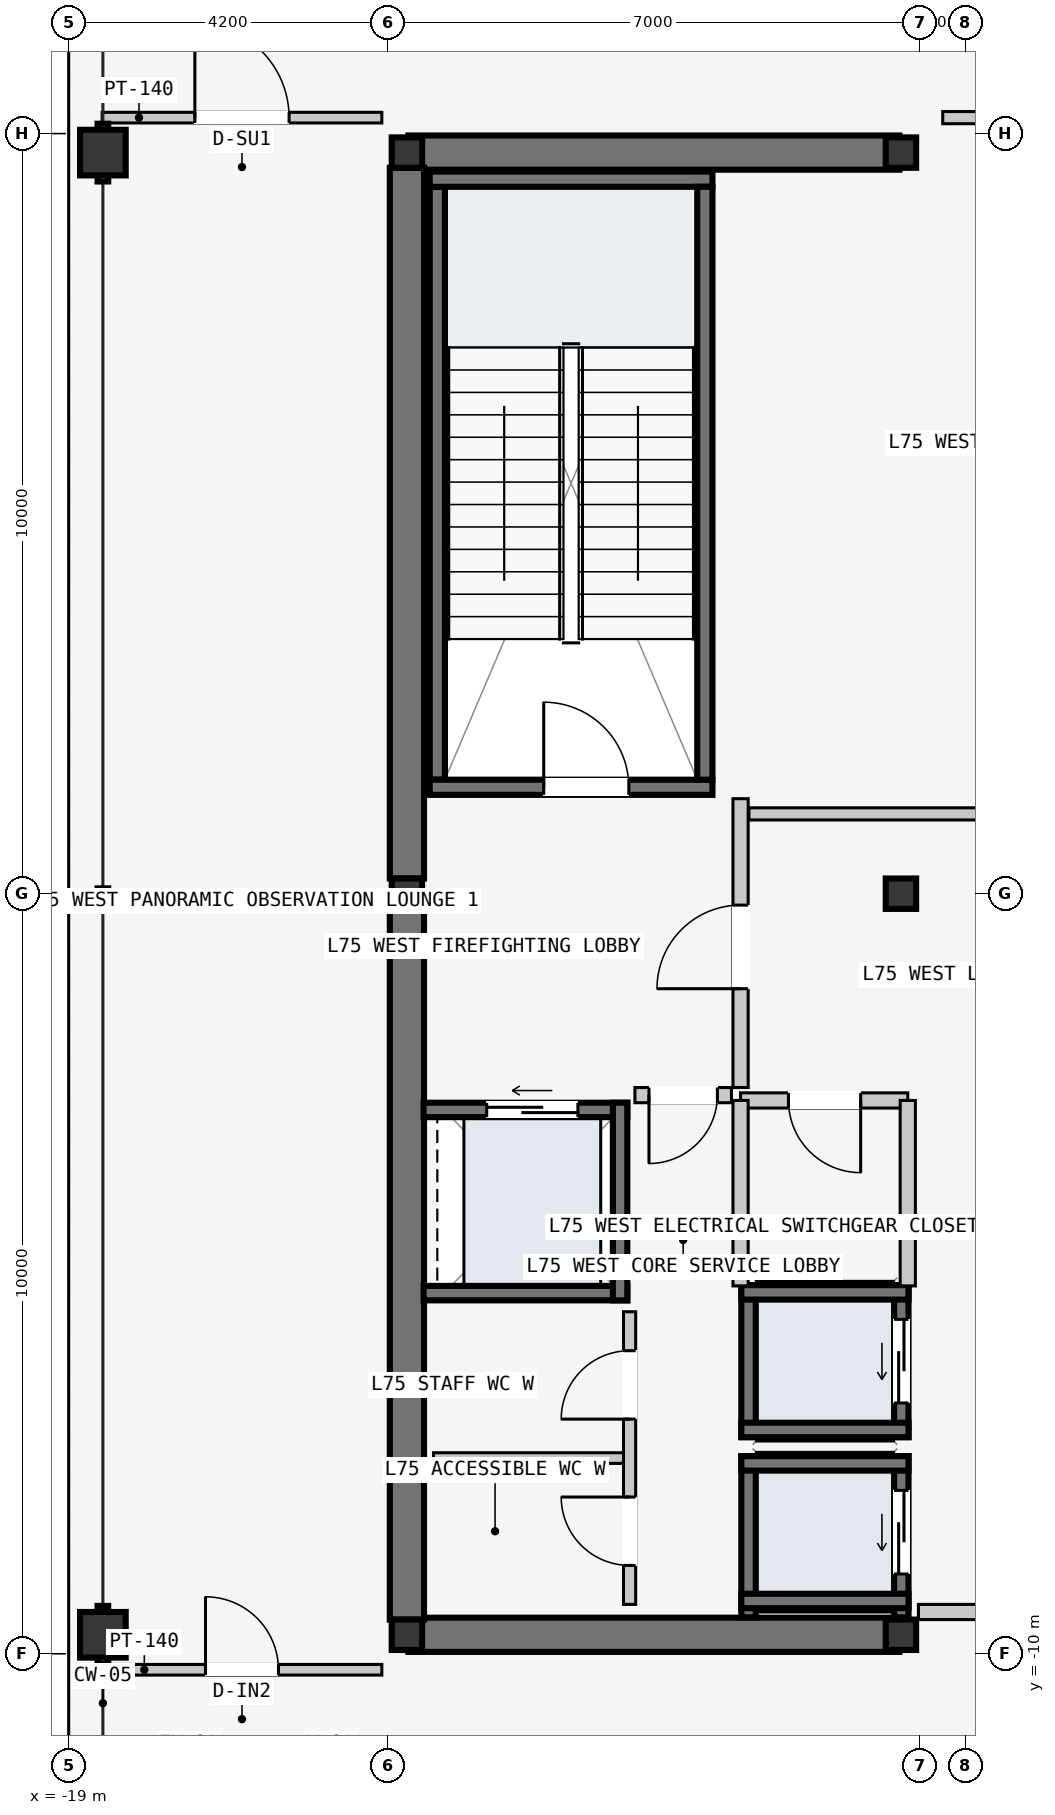
"""IFC4 building model, lengths in metres.
Left out: names, types, materials, properties, quantities, classifications, styles, units other than length and angle.
Written with IfcOpenShell. Run it as: python <this file> out.ifc"""

import sys

from ifc_helpers import new_model, si_unit, direction, frame, frame_2d, origin, origin_2d, place, context, subcontext, project, spatial, rectangle, hollow_rectangle, i_section, extrude, element, fill, save


model = new_model("IFC4")
c1 = context("Model", 3, precision=1e-05, world=origin(), true_north=direction((0.0, 1.0)))
c2 = subcontext(c1, "Body", "Model", "MODEL_VIEW")
j1 = project(units=[si_unit("LENGTHUNIT", "METRE"), si_unit("PLANEANGLEUNIT", "RADIAN")], contexts=[c1])
p1 = place(None, origin())
s1 = spatial("IfcSite", under=j1, at=p1, CompositionType="ELEMENT")
p2 = place(p1, origin())
s2 = spatial("IfcBuilding", under=s1, at=p2, CompositionType="ELEMENT")
p3 = place(p2, frame((0.0, 0.0, 284.4)))
s3 = spatial("IfcBuildingStorey", under=s2, at=p3, CompositionType="ELEMENT", Elevation=284.4)
for number, where, z_axis, x_axis in (
    (1, (-14.53, -9.75, -0.2), (0.0, 0.0, 1.0), (1.0, 0.0, 0.0)),
    (2, (-14.53, 9.75, -0.2), (0.0, 0.0, 1.0), (1.0, 0.0, 0.0)),
):
    element("IfcWall", number, at=place(p3, frame(where, z_axis=z_axis, x_axis=x_axis)), inside=s3, PredefinedType="SHEAR", context=c2, shape_type="SweptSolid", body=[
        extrude(rectangle(XDim=6.46, YDim=0.45, at=frame_2d((3.23, 0.0))), origin(), (0.0, 0.0, 1.0), 4.8),
    ])
for number, where, z_axis, x_axis in (
    (3, (-14.55, -9.55, -0.2), (0.0, 0.0, 1.0), (0.0, 1.0, 0.0)),
    (4, (-14.55, 0.2, -0.2), (0.0, 0.0, 1.0), (0.0, 1.0, 0.0)),
):
    element("IfcWall", number, at=place(p3, frame(where, z_axis=z_axis, x_axis=x_axis)), inside=s3, PredefinedType="SHEAR", context=c2, shape_type="SweptSolid", body=[
        extrude(rectangle(XDim=9.35, YDim=0.45, at=frame_2d((4.675, 0.0))), origin(), (0.0, 0.0, 1.0), 4.8),
    ])
p4 = place(p3, frame((-14.15, 1.5, -0.2), z_axis=(0.0, 0.0, 1.0), x_axis=(0.0, 1.0, 0.0)))
e5 = element("IfcWall", 5, at=p4, inside=s3, PredefinedType="SOLIDWALL", context=c2, shape_type="SweptSolid", body=[
    extrude(rectangle(XDim=7.8, YDim=0.2, at=frame_2d((3.9, 0.0))), origin(), (0.0, 0.0, 1.0), 4.8),
])
p5 = place(p3, frame((-14.25, 1.4, -0.2), z_axis=(0.0, 0.0, 1.0), x_axis=(1.0, 0.0, 0.0)))
e6 = element("IfcWall", 6, at=p5, inside=s3, PredefinedType="SOLIDWALL", context=c2, shape_type="SweptSolid", body=[
    extrude(rectangle(XDim=3.72, YDim=0.2, at=frame_2d((1.86, 0.0))), origin(), (0.0, 0.0, 1.0), 4.8),
])
p6 = place(p5, frame((1.5, 0.0, 0.2)))
e7 = element("IfcOpeningElement", 7, at=p6, cuts=e6, PredefinedType="OPENING", context=c2, shape_type="SweptSolid", body=[
    extrude(rectangle(XDim=1.12, YDim=2.18, at=frame_2d((0.56, 1.09))), frame((0.0, 0.11, 0.0), z_axis=(0.0, -1.0, 0.0), x_axis=(1.0, 0.0, 0.0)), (0.0, 0.0, 1.0), 0.22),
])
p7 = place(p3, frame((-14.25, 9.4, -0.2), z_axis=(0.0, 0.0, 1.0), x_axis=(1.0, 0.0, 0.0)))
e8 = element("IfcWall", 8, at=p7, inside=s3, PredefinedType="SOLIDWALL", context=c2, shape_type="SweptSolid", body=[
    extrude(rectangle(XDim=3.72, YDim=0.2, at=frame_2d((1.86, 0.0))), origin(), (0.0, 0.0, 1.0), 4.8),
])
p8 = place(p3, frame((-10.63, 1.5, -0.2), z_axis=(0.0, 0.0, 1.0), x_axis=(0.0, 1.0, 0.0)))
e9 = element("IfcWall", 9, at=p8, inside=s3, PredefinedType="SOLIDWALL", context=c2, shape_type="SweptSolid", body=[
    extrude(rectangle(XDim=7.8, YDim=0.2, at=frame_2d((3.9, 0.0))), origin(), (0.0, 0.0, 1.0), 4.8),
])
for number, where, z_axis, x_axis in (
    (10, (-14.55, -9.75, 0.0), (0.0, 0.0, 1.0), (1.0, 0.0, 0.0)),
    (11, (-14.55, 0.0, 0.0), (0.0, 0.0, 1.0), (1.0, 0.0, 0.0)),
    (12, (-14.55, 9.75, 0.0), (0.0, 0.0, 1.0), (1.0, 0.0, 0.0)),
    (13, (-8.05, -9.75, 0.0), (0.0, 0.0, 1.0), (1.0, 0.0, 0.0)),
    (14, (-8.05, 0.0, 0.0), (0.0, 0.0, 1.0), (1.0, 0.0, 0.0)),
    (15, (-8.05, 9.75, 0.0), (0.0, 0.0, 1.0), (1.0, 0.0, 0.0)),
):
    element("IfcColumn", number, at=place(p3, frame(where, z_axis=z_axis, x_axis=x_axis)), inside=s3, PredefinedType="COLUMN", context=c2, shape_type="SweptSolid", body=[
        extrude(i_section(OverallWidth=0.4, OverallDepth=0.4, WebThickness=0.013, FlangeThickness=0.021, at=origin_2d()), origin(), (0.0, 0.0, 1.0), 4.8),
    ])
for number, where, z_axis, x_axis in (
    (16, (-18.55, -9.75, 0.0), (0.0, 0.0, 1.0), (0.0, 1.0, 0.0)),
    (17, (-18.55, 9.75, 0.0), (0.0, 0.0, 1.0), (0.0, 1.0, 0.0)),
):
    element("IfcColumn", number, at=place(p3, frame(where, z_axis=z_axis, x_axis=x_axis)), inside=s3, PredefinedType="COLUMN", context=c2, shape_type="SweptSolid", body=[
        extrude(hollow_rectangle(XDim=0.6, YDim=0.6, WallThickness=0.025, at=origin_2d()), origin(), (0.0, 0.0, 1.0), 4.8),
    ])
p9 = place(p3, frame((-8.045, -9.52, -0.2), z_axis=(0.0, 0.0, 1.0), x_axis=(0.0, 1.0, 0.0)))
e18 = element("IfcWall", 18, at=p9, inside=s3, PredefinedType="SOLIDWALL", context=c2, shape_type="SweptSolid", body=[
    extrude(rectangle(XDim=2.12, YDim=0.19, at=frame_2d((1.06, 0.0))), origin(), (0.0, 0.0, 1.0), 4.8),
])
p10 = place(p9, frame((0.57, 0.0, 0.2)))
e19 = element("IfcOpeningElement", 19, at=p10, cuts=e18, PredefinedType="OPENING", context=c2, shape_type="SweptSolid", body=[
    extrude(rectangle(XDim=1.1, YDim=2.2, at=frame_2d((0.55, 1.1))), frame((0.0, 0.105, 0.0), z_axis=(0.0, -1.0, 0.0), x_axis=(1.0, 0.0, 0.0)), (0.0, 0.0, 1.0), 0.21),
])
p11 = place(p3, frame((-10.055, -9.52, -0.2), z_axis=(0.0, 0.0, 1.0), x_axis=(0.0, 1.0, 0.0)))
e20 = element("IfcWall", 20, at=p11, inside=s3, PredefinedType="SOLIDWALL", context=c2, shape_type="SweptSolid", body=[
    extrude(rectangle(XDim=2.12, YDim=0.19, at=frame_2d((1.06, 0.0))), origin(), (0.0, 0.0, 1.0), 4.8),
])
for number, where, z_axis, x_axis in (
    (21, (-10.15, -7.495, -0.2), (0.0, 0.0, 1.0), (1.0, 0.0, 0.0)),
    (22, (-10.15, -9.305, -0.2), (0.0, 0.0, 1.0), (1.0, 0.0, 0.0)),
):
    element("IfcWall", number, at=place(p3, frame(where, z_axis=z_axis, x_axis=x_axis)), inside=s3, PredefinedType="SOLIDWALL", context=c2, shape_type="SweptSolid", body=[
        extrude(rectangle(XDim=2.2, YDim=0.19, at=frame_2d((1.1, 0.0))), origin(), (0.0, 0.0, 1.0), 4.8),
    ])
p12 = place(p3, frame((-8.045, -7.15, -0.2), z_axis=(0.0, 0.0, 1.0), x_axis=(0.0, 1.0, 0.0)))
e23 = element("IfcWall", 23, at=p12, inside=s3, PredefinedType="SOLIDWALL", context=c2, shape_type="SweptSolid", body=[
    extrude(rectangle(XDim=2.0, YDim=0.19, at=frame_2d((1.0, 0.0))), origin(), (0.0, 0.0, 1.0), 4.8),
])
p13 = place(p12, frame((0.45, 0.0, 0.2)))
e24 = element("IfcOpeningElement", 24, at=p13, cuts=e23, PredefinedType="OPENING", context=c2, shape_type="SweptSolid", body=[
    extrude(rectangle(XDim=1.1, YDim=2.2, at=frame_2d((0.55, 1.1))), frame((0.0, 0.105, 0.0), z_axis=(0.0, -1.0, 0.0), x_axis=(1.0, 0.0, 0.0)), (0.0, 0.0, 1.0), 0.21),
])
p14 = place(p3, frame((-10.055, -7.15, -0.2), z_axis=(0.0, 0.0, 1.0), x_axis=(0.0, 1.0, 0.0)))
e25 = element("IfcWall", 25, at=p14, inside=s3, PredefinedType="SOLIDWALL", context=c2, shape_type="SweptSolid", body=[
    extrude(rectangle(XDim=2.0, YDim=0.19, at=frame_2d((1.0, 0.0))), origin(), (0.0, 0.0, 1.0), 4.8),
])
for number, where, z_axis, x_axis in (
    (26, (-10.15, -5.245, -0.2), (0.0, 0.0, 1.0), (1.0, 0.0, 0.0)),
    (27, (-10.15, -7.055, -0.2), (0.0, 0.0, 1.0), (1.0, 0.0, 0.0)),
):
    element("IfcWall", number, at=place(p3, frame(where, z_axis=z_axis, x_axis=x_axis)), inside=s3, PredefinedType="SOLIDWALL", context=c2, shape_type="SweptSolid", body=[
        extrude(rectangle(XDim=2.2, YDim=0.19, at=frame_2d((1.1, 0.0))), origin(), (0.0, 0.0, 1.0), 4.8),
    ])
p15 = place(p3, frame((-14.33, -2.845, -0.2), z_axis=(0.0, 0.0, 1.0), x_axis=(1.0, 0.0, 0.0)))
e28 = element("IfcWall", 28, at=p15, inside=s3, PredefinedType="SOLIDWALL", context=c2, shape_type="SweptSolid", body=[
    extrude(rectangle(XDim=2.68, YDim=0.19, at=frame_2d((1.34, 0.0))), origin(), (0.0, 0.0, 1.0), 4.8),
])
p16 = place(p15, frame((0.83, 0.0, 0.2)))
e29 = element("IfcOpeningElement", 29, at=p16, cuts=e28, PredefinedType="OPENING", context=c2, shape_type="SweptSolid", body=[
    extrude(rectangle(XDim=1.2, YDim=2.2, at=frame_2d((0.6, 1.1))), frame((0.0, 0.105, 0.0), z_axis=(0.0, -1.0, 0.0), x_axis=(1.0, 0.0, 0.0)), (0.0, 0.0, 1.0), 0.21),
])
p17 = place(p3, frame((-14.33, -5.255, -0.2), z_axis=(0.0, 0.0, 1.0), x_axis=(1.0, 0.0, 0.0)))
e30 = element("IfcWall", 30, at=p17, inside=s3, PredefinedType="SOLIDWALL", context=c2, shape_type="SweptSolid", body=[
    extrude(rectangle(XDim=2.68, YDim=0.19, at=frame_2d((1.34, 0.0))), origin(), (0.0, 0.0, 1.0), 4.8),
])
p18 = place(p3, frame((-11.745, -5.35, -0.2), z_axis=(0.0, 0.0, 1.0), x_axis=(0.0, 1.0, 0.0)))
e31 = element("IfcWall", 31, at=p18, inside=s3, PredefinedType="SOLIDWALL", context=c2, shape_type="SweptSolid", body=[
    extrude(rectangle(XDim=2.6, YDim=0.19, at=frame_2d((1.3, 0.0))), origin(), (0.0, 0.0, 1.0), 4.8),
])
p19 = place(p3, frame((-6.02, -9.45, 0.0), z_axis=(0.0, 0.0, 1.0), x_axis=(-1.0, 0.0, 0.0)))
e32 = element("IfcWall", 32, at=p19, inside=s3, PredefinedType="PARTITIONING", context=c2, shape_type="SweptSolid", body=[
    extrude(rectangle(XDim=1.8, YDim=0.2, at=frame_2d((0.9, 0.0))), origin(), (0.0, 0.0, 1.0), 4.6),
])
p20 = place(p3, frame((-10.16, -2.55, 0.0), z_axis=(0.0, 0.0, 1.0), x_axis=(0.0, 1.0, 0.0)))
e33 = element("IfcWall", 33, at=p20, inside=s3, PredefinedType="PARTITIONING", context=c2, shape_type="SweptSolid", body=[
    extrude(rectangle(XDim=3.8, YDim=0.2, at=frame_2d((1.9, 0.0))), origin(), (0.0, 0.0, 1.0), 4.6),
])
p21 = place(p20, frame((1.3, 0.0, 0.0)))
e34 = element("IfcOpeningElement", 34, at=p21, cuts=e33, PredefinedType="OPENING", context=c2, shape_type="SweptSolid", body=[
    extrude(rectangle(XDim=1.1, YDim=2.15, at=frame_2d((0.55, 1.075))), frame((0.0, 0.11, 0.0), z_axis=(0.0, -1.0, 0.0), x_axis=(1.0, 0.0, 0.0)), (0.0, 0.0, 1.0), 0.22),
])
p22 = place(p3, frame((-10.28, -2.65, 0.0), z_axis=(0.0, 0.0, 1.0), x_axis=(-1.0, 0.0, 0.0)))
e35 = element("IfcWall", 35, at=p22, inside=s3, PredefinedType="PARTITIONING", context=c2, shape_type="SweptSolid", body=[
    extrude(rectangle(XDim=1.27, YDim=0.2, at=frame_2d((0.635, 0.0))), origin(), (0.0, 0.0, 1.0), 4.6),
])
p23 = place(p22, frame((0.185, 0.0, 0.0)))
e36 = element("IfcOpeningElement", 36, at=p23, cuts=e35, PredefinedType="OPENING", context=c2, shape_type="SweptSolid", body=[
    extrude(rectangle(XDim=0.9, YDim=2.15, at=frame_2d((0.45, 1.075))), frame((0.0, 0.11, 0.0), z_axis=(0.0, -1.0, 0.0), x_axis=(1.0, 0.0, 0.0)), (0.0, 0.0, 1.0), 0.22),
])
p24 = place(p3, frame((-7.96, -2.72, 0.0), z_axis=(0.0, 0.0, 1.0), x_axis=(-1.0, 0.0, 0.0)))
e37 = element("IfcWall", 37, at=p24, inside=s3, PredefinedType="PARTITIONING", context=c2, shape_type="SweptSolid", body=[
    extrude(rectangle(XDim=2.2, YDim=0.2, at=frame_2d((1.1, 0.0))), origin(), (0.0, 0.0, 1.0), 4.6),
])
p25 = place(p24, frame((0.62, 0.0, 0.0)))
e38 = element("IfcOpeningElement", 38, at=p25, cuts=e37, PredefinedType="OPENING", context=c2, shape_type="SweptSolid", body=[
    extrude(rectangle(XDim=0.95, YDim=2.1, at=frame_2d((0.475, 1.05))), frame((0.0, 0.11, 0.0), z_axis=(0.0, -1.0, 0.0), x_axis=(1.0, 0.0, 0.0)), (0.0, 0.0, 1.0), 0.22),
])
for number, where, z_axis, x_axis in (
    (39, (-7.96, -5.16, 0.0), (0.0, 0.0, 1.0), (0.0, 1.0, 0.0)),
    (40, (-10.16, -5.16, 0.0), (0.0, 0.0, 1.0), (0.0, 1.0, 0.0)),
):
    element("IfcWall", number, at=place(p3, frame(where, z_axis=z_axis, x_axis=x_axis)), inside=s3, PredefinedType="PARTITIONING", context=c2, shape_type="SweptSolid", body=[
        extrude(rectangle(XDim=2.44, YDim=0.2, at=frame_2d((1.22, 0.0))), origin(), (0.0, 0.0, 1.0), 4.6),
    ])
p26 = place(p3, frame((-11.7, -7.425, 0.0), z_axis=(0.0, 0.0, 1.0), x_axis=(-1.0, 0.0, 0.0)))
e41 = element("IfcWall", 41, at=p26, inside=s3, PredefinedType="PARTITIONING", context=c2, shape_type="SweptSolid", body=[
    extrude(rectangle(XDim=2.5, YDim=0.14, at=frame_2d((1.25, 0.0))), origin(), (0.0, 0.0, 1.0), 4.6),
])
p27 = place(p3, frame((-11.62, -9.35, 0.0), z_axis=(0.0, 0.0, 1.0), x_axis=(0.0, 1.0, 0.0)))
e42 = element("IfcWall", 42, at=p27, inside=s3, PredefinedType="PARTITIONING", context=c2, shape_type="SweptSolid", body=[
    extrude(rectangle(XDim=3.85, YDim=0.16, at=frame_2d((1.925, 0.0))), origin(), (0.0, 0.0, 1.0), 4.6),
])
p28 = place(p27, frame((0.512, 0.0, 0.0)))
e43 = element("IfcOpeningElement", 43, at=p28, cuts=e42, PredefinedType="OPENING", context=c2, shape_type="SweptSolid", body=[
    extrude(rectangle(XDim=0.9, YDim=2.15, at=frame_2d((0.45, 1.075))), frame((0.0, 0.09, 0.0), z_axis=(0.0, -1.0, 0.0), x_axis=(1.0, 0.0, 0.0)), (0.0, 0.0, 1.0), 0.18),
])
p29 = place(p27, frame((2.438, 0.0, 0.0)))
e44 = element("IfcOpeningElement", 44, at=p29, cuts=e42, PredefinedType="OPENING", context=c2, shape_type="SweptSolid", body=[
    extrude(rectangle(XDim=0.9, YDim=2.15, at=frame_2d((0.45, 1.075))), frame((0.0, 0.09, 0.0), z_axis=(0.0, -1.0, 0.0), x_axis=(1.0, 0.0, 0.0)), (0.0, 0.0, 1.0), 0.18),
])
p30 = place(p3, frame((-10.05, 1.05, 0.0), z_axis=(0.0, 0.0, 1.0), x_axis=(1.0, 0.0, 0.0)))
e45 = element("IfcWall", 45, at=p30, inside=s3, PredefinedType="PARTITIONING", context=c2, shape_type="SweptSolid", body=[
    extrude(rectangle(XDim=10.54, YDim=0.16, at=frame_2d((5.27, 0.0))), origin(), (0.0, 0.0, 1.0), 4.6),
])
p31 = place(p3, frame((-7.5, 10.21, 0.0), z_axis=(0.0, 0.0, 1.0), x_axis=(1.0, 0.0, 0.0)))
e46 = element("IfcWall", 46, at=p31, inside=s3, PredefinedType="PARTITIONING", context=c2, shape_type="SweptSolid", body=[
    extrude(rectangle(XDim=7.99, YDim=0.16, at=frame_2d((3.995, 0.0))), origin(), (0.0, 0.0, 1.0), 4.6),
])
p32 = place(p3, frame((-18.56, 10.21, 0.0), z_axis=(0.0, 0.0, 1.0), x_axis=(1.0, 0.0, 0.0)))
e47 = element("IfcWall", 47, at=p32, inside=s3, PredefinedType="PARTITIONING", context=c2, shape_type="SweptSolid", body=[
    extrude(rectangle(XDim=3.68, YDim=0.14, at=frame_2d((1.84, 0.0))), origin(), (0.0, 0.0, 1.0), 4.6),
])
p33 = place(p32, frame((1.22, 0.0, 0.0)))
e48 = element("IfcOpeningElement", 48, at=p33, cuts=e47, PredefinedType="OPENING", context=c2, shape_type="SweptSolid", body=[
    extrude(rectangle(XDim=1.24, YDim=2.24, at=frame_2d((0.62, 1.12))), frame((0.0, 0.08, 0.0), z_axis=(0.0, -1.0, 0.0), x_axis=(1.0, 0.0, 0.0)), (0.0, 0.0, 1.0), 0.16),
])
p34 = place(p3, frame((-18.56, -10.21, 0.0), z_axis=(0.0, 0.0, 1.0), x_axis=(1.0, 0.0, 0.0)))
e49 = element("IfcWall", 49, at=p34, inside=s3, PredefinedType="PARTITIONING", context=c2, shape_type="SweptSolid", body=[
    extrude(rectangle(XDim=3.68, YDim=0.14, at=frame_2d((1.84, 0.0))), origin(), (0.0, 0.0, 1.0), 4.6),
])
p35 = place(p34, frame((1.36, 0.0, 0.0)))
e50 = element("IfcOpeningElement", 50, at=p35, cuts=e49, PredefinedType="OPENING", context=c2, shape_type="SweptSolid", body=[
    extrude(rectangle(XDim=0.96, YDim=2.18, at=frame_2d((0.48, 1.09))), frame((0.0, 0.08, 0.0), z_axis=(0.0, -1.0, 0.0), x_axis=(1.0, 0.0, 0.0)), (0.0, 0.0, 1.0), 0.16),
])
p36 = place(p6, origin())
e51 = element("IfcDoor", 51, at=p36, inside=s3, OperationType="SINGLE_SWING_LEFT", PredefinedType="DOOR", context=c2, shape_type="SweptSolid", body=[
    extrude(rectangle(XDim=1.12, YDim=2.18, at=frame_2d((0.56, 1.09))), frame((0.0, 0.025, 0.0), z_axis=(0.0, -1.0, 0.0), x_axis=(1.0, 0.0, 0.0)), (0.0, 0.0, 1.0), 0.05),
])
fill(e7, e51)
p37 = place(p10, origin())
e52 = element("IfcDoor", 52, at=p37, inside=s3, OperationType="SLIDING_TO_LEFT", PredefinedType="DOOR", context=c2, shape_type="SweptSolid", body=[
    extrude(rectangle(XDim=1.1, YDim=2.2, at=frame_2d((0.55, 1.1))), frame((0.0, 0.025, 0.0), z_axis=(0.0, -1.0, 0.0), x_axis=(1.0, 0.0, 0.0)), (0.0, 0.0, 1.0), 0.05),
])
fill(e19, e52)
p38 = place(p13, origin())
e53 = element("IfcDoor", 53, at=p38, inside=s3, OperationType="SLIDING_TO_LEFT", PredefinedType="DOOR", context=c2, shape_type="SweptSolid", body=[
    extrude(rectangle(XDim=1.1, YDim=2.2, at=frame_2d((0.55, 1.1))), frame((0.0, 0.025, 0.0), z_axis=(0.0, -1.0, 0.0), x_axis=(1.0, 0.0, 0.0)), (0.0, 0.0, 1.0), 0.05),
])
fill(e24, e53)
p39 = place(p16, origin())
e54 = element("IfcDoor", 54, at=p39, inside=s3, OperationType="SLIDING_TO_LEFT", PredefinedType="DOOR", context=c2, shape_type="SweptSolid", body=[
    extrude(rectangle(XDim=1.2, YDim=2.2, at=frame_2d((0.6, 1.1))), frame((0.0, 0.025, 0.0), z_axis=(0.0, -1.0, 0.0), x_axis=(1.0, 0.0, 0.0)), (0.0, 0.0, 1.0), 0.05),
])
fill(e29, e54)
p40 = place(p21, origin())
e55 = element("IfcDoor", 55, at=p40, inside=s3, OperationType="SINGLE_SWING_LEFT", PredefinedType="DOOR", context=c2, shape_type="SweptSolid", body=[
    extrude(rectangle(XDim=1.1, YDim=2.15, at=frame_2d((0.55, 1.075))), frame((0.0, 0.025, 0.0), z_axis=(0.0, -1.0, 0.0), x_axis=(1.0, 0.0, 0.0)), (0.0, 0.0, 1.0), 0.05),
])
fill(e34, e55)
p41 = place(p23, origin())
e56 = element("IfcDoor", 56, at=p41, inside=s3, OperationType="SINGLE_SWING_RIGHT", PredefinedType="DOOR", context=c2, shape_type="SweptSolid", body=[
    extrude(rectangle(XDim=0.9, YDim=2.15, at=frame_2d((0.45, 1.075))), frame((0.0, 0.025, 0.0), z_axis=(0.0, -1.0, 0.0), x_axis=(1.0, 0.0, 0.0)), (0.0, 0.0, 1.0), 0.05),
])
fill(e36, e56)
p42 = place(p25, origin())
e57 = element("IfcDoor", 57, at=p42, inside=s3, OperationType="SINGLE_SWING_LEFT", PredefinedType="DOOR", context=c2, shape_type="SweptSolid", body=[
    extrude(rectangle(XDim=0.95, YDim=2.1, at=frame_2d((0.475, 1.05))), frame((0.0, 0.025, 0.0), z_axis=(0.0, -1.0, 0.0), x_axis=(1.0, 0.0, 0.0)), (0.0, 0.0, 1.0), 0.05),
])
fill(e38, e57)
p43 = place(p28, origin())
e58 = element("IfcDoor", 58, at=p43, inside=s3, OperationType="SINGLE_SWING_RIGHT", PredefinedType="DOOR", context=c2, shape_type="SweptSolid", body=[
    extrude(rectangle(XDim=0.9, YDim=2.15, at=frame_2d((0.45, 1.075))), frame((0.0, 0.025, 0.0), z_axis=(0.0, -1.0, 0.0), x_axis=(1.0, 0.0, 0.0)), (0.0, 0.0, 1.0), 0.05),
])
fill(e43, e58)
p44 = place(p29, origin())
e59 = element("IfcDoor", 59, at=p44, inside=s3, OperationType="SINGLE_SWING_LEFT", PredefinedType="DOOR", context=c2, shape_type="SweptSolid", body=[
    extrude(rectangle(XDim=0.9, YDim=2.15, at=frame_2d((0.45, 1.075))), frame((0.0, 0.025, 0.0), z_axis=(0.0, -1.0, 0.0), x_axis=(1.0, 0.0, 0.0)), (0.0, 0.0, 1.0), 0.05),
])
fill(e44, e59)
p45 = place(p33, origin())
e60 = element("IfcDoor", 60, at=p45, inside=s3, OperationType="SINGLE_SWING_LEFT", PredefinedType="DOOR", context=c2, shape_type="SweptSolid", body=[
    extrude(rectangle(XDim=1.24, YDim=2.24, at=frame_2d((0.62, 1.12))), frame((0.0, 0.025, 0.0), z_axis=(0.0, -1.0, 0.0), x_axis=(1.0, 0.0, 0.0)), (0.0, 0.0, 1.0), 0.05),
])
fill(e48, e60)
p46 = place(p35, origin())
e61 = element("IfcDoor", 61, at=p46, inside=s3, OperationType="SINGLE_SWING_LEFT", PredefinedType="DOOR", context=c2, shape_type="SweptSolid", body=[
    extrude(rectangle(XDim=0.96, YDim=2.18, at=frame_2d((0.48, 1.09))), frame((0.0, 0.025, 0.0), z_axis=(0.0, -1.0, 0.0), x_axis=(1.0, 0.0, 0.0)), (0.0, 0.0, 1.0), 0.05),
])
fill(e50, e61)
save(model, sys.argv[1])
